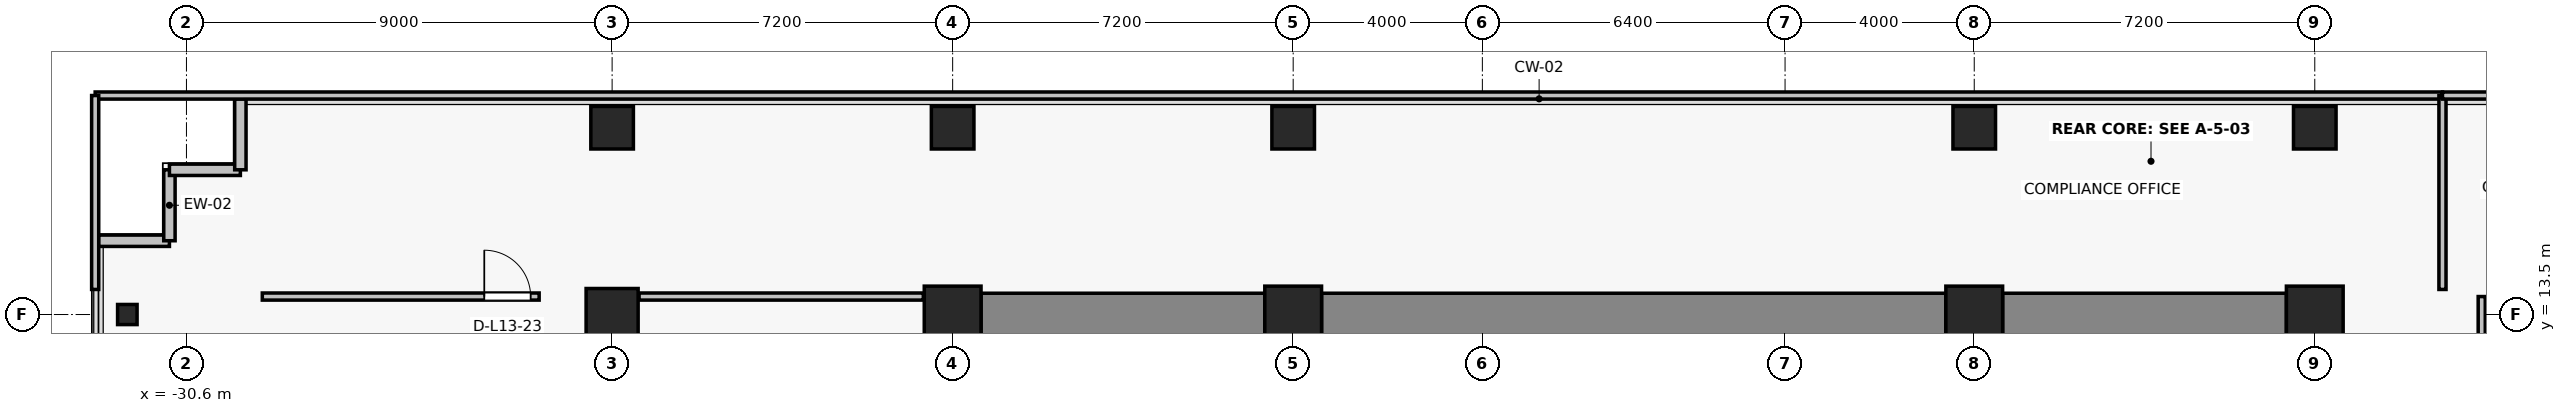
"""IFC4 building model, lengths in metres.
Left out: names, types, materials, properties, quantities, classifications, styles, units other than length and angle.
Written with IfcOpenShell. Run it as: python <this file> out.ifc"""

import sys

from ifc_helpers import new_model, si_unit, direction, frame, frame_2d, origin, origin_2d, place, context, subcontext, project, spatial, rectangle, i_section, extrude, source, transform, mapped, element, fill, save


model = new_model("IFC4")
c1 = context("Model", 3, precision=1e-05, world=origin(), true_north=direction((0.0, 1.0)))
c2 = subcontext(c1, "Body", "Model", "MODEL_VIEW")
j1 = project(units=[si_unit("LENGTHUNIT", "METRE"), si_unit("PLANEANGLEUNIT", "RADIAN")], contexts=[c1])
p1 = place(None, origin())
s1 = spatial("IfcSite", under=j1, at=p1, CompositionType="ELEMENT")
p2 = place(p1, origin())
s2 = spatial("IfcBuilding", under=s1, at=p2, CompositionType="ELEMENT")
p3 = place(p2, frame((0.0, 0.0, 50.5)))
s3 = spatial("IfcBuildingStorey", under=s2, at=p3, CompositionType="ELEMENT", Elevation=50.5)
for number, where, z_axis, x_axis in (
    (1, (-14.4, 13.5, 0.0), (0.0, 0.0, 1.0), (1.0, 0.0, 0.0)),
    (2, (-7.2, 13.5, 0.0), (0.0, 0.0, 1.0), (1.0, 0.0, 0.0)),
    (3, (7.2, 13.5, 0.0), (0.0, 0.0, 1.0), (1.0, 0.0, 0.0)),
    (4, (14.4, 13.5, 0.0), (0.0, 0.0, 1.0), (1.0, 0.0, 0.0)),
):
    element("IfcColumn", number, at=place(p3, frame(where, z_axis=z_axis, x_axis=x_axis)), inside=s3, PredefinedType="COLUMN", context=c2, shape_type="SweptSolid", body=[
        extrude(rectangle(XDim=1.2, YDim=1.2, at=origin_2d()), origin(), (0.0, 0.0, 1.0), 3.3),
    ])
p4 = place(p3, frame((-21.6, 13.5, 0.0), z_axis=(0.0, 0.0, 1.0), x_axis=(1.0, 0.0, 0.0)))
e5 = element("IfcColumn", 5, at=p4, inside=s3, PredefinedType="COLUMN", context=c2, shape_type="SweptSolid", body=[
    extrude(rectangle(XDim=1.1, YDim=1.1, at=origin_2d()), origin(), (0.0, 0.0, 1.0), 3.3),
])
for number, where, z_axis, x_axis in (
    (6, (-14.4, 17.45, 0.0), (0.0, 0.0, 1.0), (1.0, 0.0, 0.0)),
    (7, (-7.2, 17.45, 0.0), (0.0, 0.0, 1.0), (1.0, 0.0, 0.0)),
    (8, (7.2, 17.45, 0.0), (0.0, 0.0, 1.0), (1.0, 0.0, 0.0)),
    (9, (14.4, 17.45, 0.0), (0.0, 0.0, 1.0), (1.0, 0.0, 0.0)),
    (10, (-21.6, 17.45, 0.0), (0.0, 0.0, 1.0), (1.0, 0.0, 0.0)),
):
    element("IfcColumn", number, at=place(p3, frame(where, z_axis=z_axis, x_axis=x_axis)), inside=s3, PredefinedType="COLUMN", context=c2, shape_type="SweptSolid", body=[
        extrude(rectangle(XDim=0.9, YDim=0.9, at=origin_2d()), origin(), (0.0, 0.0, 1.0), 3.3),
    ])
p5 = place(p3, frame((-31.85, 13.5, 0.0), z_axis=(0.0, 0.0, 1.0), x_axis=(1.0, 0.0, 0.0)))
e11 = element("IfcColumn", 11, at=p5, inside=s3, PredefinedType="COLUMN", context=c2, shape_type="SweptSolid", body=[
    extrude(i_section(OverallWidth=0.412, OverallDepth=0.425, WebThickness=0.026, FlangeThickness=0.039, FilletRadius=0.015, at=origin_2d()), origin(), (0.0, 0.0, 1.0), 3.3),
])
p6 = place(p3, frame((-13.8, 13.5, 0.0), z_axis=(0.0, 0.0, 1.0), x_axis=(1.0, 0.0, 0.0)))
e12 = element("IfcWall", 12, at=p6, inside=s3, PredefinedType="SHEAR", context=c2, shape_type="SweptSolid", body=[
    extrude(rectangle(XDim=6.0, YDim=0.9, at=frame_2d((3.0, 0.0))), origin(), (0.0, 0.0, 1.0), 3.075),
])
p7 = place(p3, frame((-6.6, 13.5, 0.0), z_axis=(0.0, 0.0, 1.0), x_axis=(1.0, 0.0, 0.0)))
e13 = element("IfcWall", 13, at=p7, inside=s3, PredefinedType="SHEAR", context=c2, shape_type="SweptSolid", body=[
    extrude(rectangle(XDim=13.2, YDim=0.9, at=frame_2d((6.6, 0.0))), origin(), (0.0, 0.0, 1.0), 3.075),
])
p8 = place(p3, frame((7.8, 13.5, 0.0), z_axis=(0.0, 0.0, 1.0), x_axis=(1.0, 0.0, 0.0)))
e14 = element("IfcWall", 14, at=p8, inside=s3, PredefinedType="SHEAR", context=c2, shape_type="SweptSolid", body=[
    extrude(rectangle(XDim=6.0, YDim=0.9, at=frame_2d((3.0, 0.0))), origin(), (0.0, 0.0, 1.0), 3.075),
])
for number, where, z_axis, x_axis in (
    (15, (-30.96, 15.06, 0.0), (0.0, 0.0, 1.0), (-1.0, 0.0, 0.0)),
    (16, (-30.96, 16.56, 0.0), (0.0, 0.0, 1.0), (0.0, -1.0, 0.0)),
    (17, (-29.46, 16.56, 0.0), (0.0, 0.0, 1.0), (-1.0, 0.0, 0.0)),
    (18, (-29.46, 18.06, 0.0), (0.0, 0.0, 1.0), (0.0, -1.0, 0.0)),
):
    element("IfcWall", number, at=place(p3, frame(where, z_axis=z_axis, x_axis=x_axis)), inside=s3, PredefinedType="SOLIDWALL", context=c2, shape_type="SweptSolid", body=[
        extrude(rectangle(XDim=1.5, YDim=0.24, at=frame_2d((0.75, 0.0))), origin(), (0.0, 0.0, 1.0), 3.075),
    ])
p9 = place(p3, frame((-28.996, 13.88, 0.0), z_axis=(0.0, 0.0, 1.0), x_axis=(1.0, 0.0, 0.0)))
e19 = element("IfcWall", 19, at=p9, inside=s3, PredefinedType="PARTITIONING", context=c2, shape_type="SweptSolid", body=[
    extrude(rectangle(XDim=5.853, YDim=0.15, at=frame_2d((2.927, 0.0))), origin(), (0.0, 0.0, 1.0), 3.075),
])
p10 = place(p9, frame((4.693, 0.0, 0.0)))
e20 = element("IfcOpeningElement", 20, at=p10, cuts=e19, PredefinedType="OPENING", context=c2, shape_type="SweptSolid", body=[
    extrude(rectangle(XDim=0.98, YDim=2.15, at=frame_2d((0.49, 1.075))), frame((0.0, 0.085, 0.0), z_axis=(0.0, -1.0, 0.0), x_axis=(1.0, 0.0, 0.0)), (0.0, 0.0, 1.0), 0.17),
])
p11 = place(p3, frame((-21.03, 13.88, 0.0), z_axis=(0.0, 0.0, 1.0), x_axis=(1.0, 0.0, 0.0)))
e21 = element("IfcWall", 21, at=p11, inside=s3, PredefinedType="PARTITIONING", context=c2, shape_type="SweptSolid", body=[
    extrude(rectangle(XDim=6.01, YDim=0.15, at=frame_2d((3.005, 0.0))), origin(), (0.0, 0.0, 1.0), 3.075),
])
p12 = place(p3, frame((17.93, 8.075, 0.0), z_axis=(0.0, 0.0, 1.0), x_axis=(0.0, 1.0, 0.0)))
e22 = element("IfcWall", 22, at=p12, inside=s3, PredefinedType="PARTITIONING", context=c2, shape_type="SweptSolid", body=[
    extrude(rectangle(XDim=5.805, YDim=0.15, at=frame_2d((2.902, 0.0))), origin(), (0.0, 0.0, 1.0), 2.465),
])
p13 = place(p12, frame((2.413, 0.0, 0.0)))
e23 = element("IfcOpeningElement", 23, at=p13, cuts=e22, PredefinedType="OPENING", context=c2, shape_type="SweptSolid", body=[
    extrude(rectangle(XDim=0.98, YDim=2.15, at=frame_2d((0.49, 1.075))), frame((0.0, 0.085, 0.0), z_axis=(0.0, -1.0, 0.0), x_axis=(1.0, 0.0, 0.0)), (0.0, 0.0, 1.0), 0.17),
])
p14 = place(p3, frame((-32.53, 18.13, 0.0), z_axis=(0.0, 0.0, 1.0), x_axis=(1.0, 0.0, 0.0)))
e24 = element("IfcWall", 24, at=p14, inside=s3, PredefinedType="PARTITIONING", context=c2, shape_type="SweptSolid", body=[
    extrude(rectangle(XDim=49.63, YDim=0.15, at=frame_2d((24.815, 0.0))), origin(), (0.0, 0.0, 1.0), 3.075),
])
p15 = place(p3, frame((-32.53, 14.03, 0.0), z_axis=(0.0, 0.0, 1.0), x_axis=(0.0, 1.0, 0.0)))
e25 = element("IfcWall", 25, at=p15, inside=s3, PredefinedType="PARTITIONING", context=c2, shape_type="SweptSolid", body=[
    extrude(rectangle(XDim=4.1, YDim=0.15, at=frame_2d((2.05, 0.0))), origin(), (0.0, 0.0, 1.0), 3.075),
])
p16 = place(p3, frame((17.1, 18.13, 0.0), z_axis=(0.0, 0.0, 1.0), x_axis=(0.0, -1.0, 0.0)))
e26 = element("IfcWall", 26, at=p16, inside=s3, PredefinedType="PARTITIONING", context=c2, shape_type="SweptSolid", body=[
    extrude(rectangle(XDim=4.1, YDim=0.15, at=frame_2d((2.05, 0.0))), origin(), (0.0, 0.0, 1.0), 2.465),
])
p17 = place(p3, frame((17.1, 18.13, 0.0), z_axis=(0.0, 0.0, 1.0), x_axis=(1.0, 0.0, 0.0)))
e27 = element("IfcWall", 27, at=p17, inside=s3, PredefinedType="PARTITIONING", context=c2, shape_type="SweptSolid", body=[
    extrude(rectangle(XDim=11.43, YDim=0.15, at=frame_2d((5.715, 0.0))), origin(), (0.0, 0.0, 1.0), 3.075),
])
m1 = source(origin(), c2, "Body", "SweptSolid", [
    extrude(rectangle(XDim=0.98, YDim=2.15, at=frame_2d((0.49, 1.075))), frame((0.0, 0.025, 0.0), z_axis=(0.0, -1.0, 0.0), x_axis=(1.0, 0.0, 0.0)), (0.0, 0.0, 1.0), 0.05),
])
p18 = place(p10, origin())
e28 = element("IfcDoor", 28, at=p18, inside=s3, OperationType="SINGLE_SWING_LEFT", PredefinedType="DOOR", context=c2, shape_type="MappedRepresentation", body=[
    mapped(m1, transform((0.0, 0.0, 0.0), x_axis=(1.0, 0.0, 0.0), y_axis=(0.0, 1.0, 0.0), z_axis=(0.0, 0.0, 1.0), scale=1.0)),
])
fill(e20, e28)
save(model, sys.argv[1])
